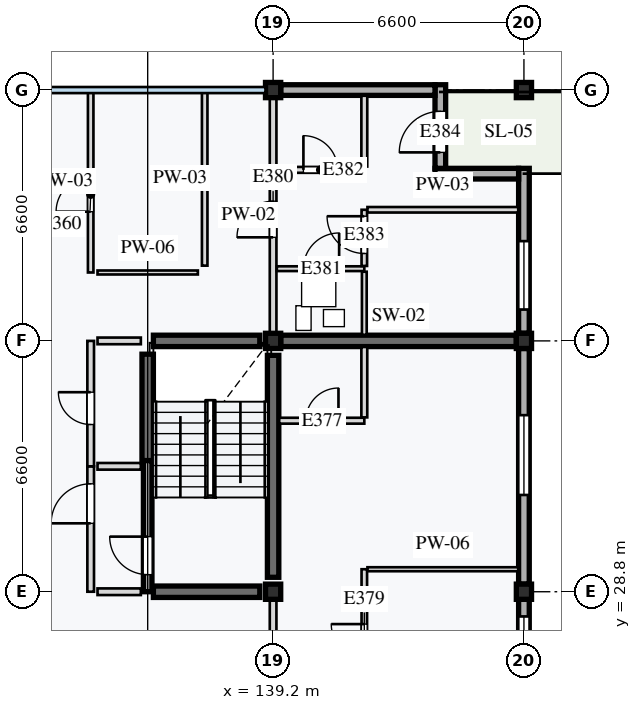
"""IFC4 building model, lengths in metres.
Left out: names, types, materials, properties, quantities, classifications, styles, units other than length and angle.
Written with IfcOpenShell. Run it as: python <this file> out.ifc"""

import sys

from ifc_helpers import new_model, si_unit, direction, frame, frame_2d, origin, origin_2d, place, context, subcontext, project, spatial, rectangle, extrude, element, fill, save


model = new_model("IFC4")
c1 = context("Model", 3, precision=1e-05, world=origin(), true_north=direction((0.0, 1.0)))
c2 = subcontext(c1, "Body", "Model", "MODEL_VIEW")
j1 = project(units=[si_unit("LENGTHUNIT", "METRE"), si_unit("PLANEANGLEUNIT", "RADIAN")], contexts=[c1])
p1 = place(None, origin())
s1 = spatial("IfcSite", under=j1, at=p1, CompositionType="ELEMENT")
p2 = place(p1, origin())
s2 = spatial("IfcBuilding", under=s1, at=p2, CompositionType="ELEMENT")
p3 = place(p2, frame((0.0, 0.0, 30.8)))
s3 = spatial("IfcBuildingStorey", under=s2, at=p3, CompositionType="ELEMENT", Elevation=30.8)
for number, where, z_axis, x_axis in (
    (1, (139.2, 28.8, 0.0), (0.0, 0.0, 1.0), (1.0, 0.0, 0.0)),
    (2, (145.8, 28.8, 0.0), (0.0, 0.0, 1.0), (1.0, 0.0, 0.0)),
    (3, (139.2, 35.4, 0.0), (0.0, 0.0, 1.0), (1.0, 0.0, 0.0)),
    (4, (145.8, 35.4, 0.0), (0.0, 0.0, 1.0), (1.0, 0.0, 0.0)),
    (5, (139.2, 42.0, 0.0), (0.0, 0.0, 1.0), (1.0, 0.0, 0.0)),
    (6, (145.8, 42.0, 0.0), (0.0, 0.0, 1.0), (1.0, 0.0, 0.0)),
):
    element("IfcColumn", number, at=place(p3, frame(where, z_axis=z_axis, x_axis=x_axis)), inside=s3, PredefinedType="COLUMN", context=c2, shape_type="SweptSolid", body=[
        extrude(rectangle(XDim=0.4, YDim=0.4, at=origin_2d()), origin(), (0.0, 0.0, 1.0), 3.2),
    ])
p4 = place(p3, frame((139.2, 29.18, 0.0), z_axis=(0.0, 0.0, 1.0), x_axis=(0.0, 1.0, 0.0)))
e7 = element("IfcWall", 7, at=p4, inside=s3, PredefinedType="SHEAR", context=c2, shape_type="SweptSolid", body=[
    extrude(rectangle(XDim=5.84, YDim=0.3, at=frame_2d((2.92, 0.0))), origin(), (0.0, 0.0, 1.0), 2.97),
])
for number, where, z_axis, x_axis in (
    (8, (135.9, 32.25, 0.0), (0.0, 0.0, 1.0), (0.0, 1.0, 0.0)),
    (9, (136.05, 28.8, 0.0), (0.0, 0.0, 1.0), (1.0, 0.0, 0.0)),
    (10, (136.05, 35.4, 0.0), (0.0, 0.0, 1.0), (1.0, 0.0, 0.0)),
):
    element("IfcWall", number, at=place(p3, frame(where, z_axis=z_axis, x_axis=x_axis)), inside=s3, PredefinedType="SHEAR", context=c2, shape_type="SweptSolid", body=[
        extrude(rectangle(XDim=2.8, YDim=0.3, at=frame_2d((1.4, 0.0))), origin(), (0.0, 0.0, 1.0), 2.97),
    ])
p5 = place(p3, frame((139.4, 35.4, 0.0), z_axis=(0.0, 0.0, 1.0), x_axis=(1.0, 0.0, 0.0)))
e11 = element("IfcWall", 11, at=p5, inside=s3, PredefinedType="SHEAR", context=c2, shape_type="SweptSolid", body=[
    extrude(rectangle(XDim=6.2, YDim=0.3, at=frame_2d((3.1, 0.0))), origin(), (0.0, 0.0, 1.0), 2.97),
])
p6 = place(p3, frame((145.8, 22.4, 0.0), z_axis=(0.0, 0.0, 1.0), x_axis=(0.0, 1.0, 0.0)))
e12 = element("IfcWall", 12, at=p6, inside=s3, PredefinedType="STANDARD", context=c2, shape_type="SweptSolid", body=[
    extrude(rectangle(XDim=6.2, YDim=0.28, at=frame_2d((3.1, 0.0))), origin(), (0.0, 0.0, 1.0), 2.6),
])
p7 = place(p6, frame((0.525, 0.0, 0.85)))
e13 = element("IfcOpeningElement", 13, at=p7, cuts=e12, PredefinedType="OPENING", context=c2, shape_type="SweptSolid", body=[
    extrude(rectangle(XDim=1.8, YDim=1.35, at=frame_2d((0.9, 0.675))), frame((0.0, 0.15, 0.0), z_axis=(0.0, -1.0, 0.0), x_axis=(1.0, 0.0, 0.0)), (0.0, 0.0, 1.0), 0.3),
])
p8 = place(p6, frame((3.95, 0.0, 0.85)))
e14 = element("IfcOpeningElement", 14, at=p8, cuts=e12, PredefinedType="OPENING", context=c2, shape_type="SweptSolid", body=[
    extrude(rectangle(XDim=1.8, YDim=1.35, at=frame_2d((0.9, 0.675))), frame((0.0, 0.15, 0.0), z_axis=(0.0, -1.0, 0.0), x_axis=(1.0, 0.0, 0.0)), (0.0, 0.0, 1.0), 0.3),
])
p9 = place(p3, frame((145.8, 29.0, 0.0), z_axis=(0.0, 0.0, 1.0), x_axis=(0.0, 1.0, 0.0)))
e15 = element("IfcWall", 15, at=p9, inside=s3, PredefinedType="STANDARD", context=c2, shape_type="SweptSolid", body=[
    extrude(rectangle(XDim=6.2, YDim=0.28, at=frame_2d((3.1, 0.0))), origin(), (0.0, 0.0, 1.0), 2.6),
])
p10 = place(p9, frame((2.346, 0.0, 0.85)))
e16 = element("IfcOpeningElement", 16, at=p10, cuts=e15, PredefinedType="OPENING", context=c2, shape_type="SweptSolid", body=[
    extrude(rectangle(XDim=2.1, YDim=1.55, at=frame_2d((1.05, 0.775))), frame((0.0, 0.15, 0.0), z_axis=(0.0, -1.0, 0.0), x_axis=(1.0, 0.0, 0.0)), (0.0, 0.0, 1.0), 0.3),
])
p11 = place(p3, frame((145.8, 35.6, 0.0), z_axis=(0.0, 0.0, 1.0), x_axis=(0.0, 1.0, 0.0)))
e17 = element("IfcWall", 17, at=p11, inside=s3, PredefinedType="STANDARD", context=c2, shape_type="SweptSolid", body=[
    extrude(rectangle(XDim=4.34, YDim=0.28, at=frame_2d((2.17, 0.0))), origin(), (0.0, 0.0, 1.0), 2.6),
])
p12 = place(p11, frame((0.625, 0.0, 0.85)))
e18 = element("IfcOpeningElement", 18, at=p12, cuts=e17, PredefinedType="OPENING", context=c2, shape_type="SweptSolid", body=[
    extrude(rectangle(XDim=1.8, YDim=1.35, at=frame_2d((0.9, 0.675))), frame((0.0, 0.15, 0.0), z_axis=(0.0, -1.0, 0.0), x_axis=(1.0, 0.0, 0.0)), (0.0, 0.0, 1.0), 0.3),
])
p13 = place(p3, frame((145.66, 39.8, 0.0), z_axis=(0.0, 0.0, 1.0), x_axis=(-1.0, 0.0, 0.0)))
e19 = element("IfcWall", 19, at=p13, inside=s3, PredefinedType="STANDARD", context=c2, shape_type="SweptSolid", body=[
    extrude(rectangle(XDim=2.2, YDim=0.28, at=frame_2d((1.1, 0.0))), origin(), (0.0, 0.0, 1.0), 2.97),
])
p14 = place(p3, frame((143.6, 39.94, 0.0), z_axis=(0.0, 0.0, 1.0), x_axis=(0.0, 1.0, 0.0)))
e20 = element("IfcWall", 20, at=p14, inside=s3, PredefinedType="STANDARD", context=c2, shape_type="SweptSolid", body=[
    extrude(rectangle(XDim=2.2, YDim=0.28, at=frame_2d((1.1, 0.0))), origin(), (0.0, 0.0, 1.0), 2.97),
])
p15 = place(p14, frame((0.42, 0.0, 0.0)))
e21 = element("IfcOpeningElement", 21, at=p15, cuts=e20, PredefinedType="OPENING", context=c2, shape_type="SweptSolid", body=[
    extrude(rectangle(XDim=1.08, YDim=2.22, at=frame_2d((0.54, 1.11))), frame((0.0, 0.15, 0.0), z_axis=(0.0, -1.0, 0.0), x_axis=(1.0, 0.0, 0.0)), (0.0, 0.0, 1.0), 0.3),
])
p16 = place(p3, frame((139.4, 42.0, 0.0), z_axis=(0.0, 0.0, 1.0), x_axis=(1.0, 0.0, 0.0)))
e22 = element("IfcWall", 22, at=p16, inside=s3, PredefinedType="STANDARD", context=c2, shape_type="SweptSolid", body=[
    extrude(rectangle(XDim=4.06, YDim=0.28, at=frame_2d((2.03, 0.0))), origin(), (0.0, 0.0, 1.0), 2.65),
])
p17 = place(p3, frame((135.9, 28.8, 0.0), z_axis=(0.0, 0.0, 1.0), x_axis=(0.0, 1.0, 0.0)))
e23 = element("IfcWall", 23, at=p17, inside=s3, PredefinedType="STANDARD", context=c2, shape_type="SweptSolid", body=[
    extrude(rectangle(XDim=3.45, YDim=0.225, at=frame_2d((1.725, 0.0))), origin(), (0.0, 0.0, 1.0), 2.97),
])
p18 = place(p17, frame((0.45, 0.0, 0.0)))
e24 = element("IfcOpeningElement", 24, at=p18, cuts=e23, PredefinedType="OPENING", context=c2, shape_type="SweptSolid", body=[
    extrude(rectangle(XDim=1.0, YDim=2.16, at=frame_2d((0.5, 1.08))), frame((0.0, 0.123, 0.0), z_axis=(0.0, -1.0, 0.0), x_axis=(1.0, 0.0, 0.0)), (0.0, 0.0, 1.0), 0.245),
])
p19 = place(p3, frame((134.4, 28.8, 0.0), z_axis=(0.0, 0.0, 1.0), x_axis=(0.0, 1.0, 0.0)))
e25 = element("IfcWall", 25, at=p19, inside=s3, PredefinedType="PARTITIONING", context=c2, shape_type="SweptSolid", body=[
    extrude(rectangle(XDim=3.3, YDim=0.175, at=frame_2d((1.65, 0.0))), origin(), (0.0, 0.0, 1.0), 2.97),
])
p20 = place(p19, frame((1.8, 0.0, 0.0)))
e26 = element("IfcOpeningElement", 26, at=p20, cuts=e25, PredefinedType="OPENING", context=c2, shape_type="SweptSolid", body=[
    extrude(rectangle(XDim=1.04, YDim=2.12, at=frame_2d((0.52, 1.06))), frame((0.0, 0.097, 0.0), z_axis=(0.0, -1.0, 0.0), x_axis=(1.0, 0.0, 0.0)), (0.0, 0.0, 1.0), 0.195),
])
p21 = place(p3, frame((134.4, 32.1, 0.0), z_axis=(0.0, 0.0, 1.0), x_axis=(0.0, 1.0, 0.0)))
e27 = element("IfcWall", 27, at=p21, inside=s3, PredefinedType="PARTITIONING", context=c2, shape_type="SweptSolid", body=[
    extrude(rectangle(XDim=3.3, YDim=0.175, at=frame_2d((1.65, 0.0))), origin(), (0.0, 0.0, 1.0), 2.97),
])
p22 = place(p21, frame((1.1, 0.0, 0.0)))
e28 = element("IfcOpeningElement", 28, at=p22, cuts=e27, PredefinedType="OPENING", context=c2, shape_type="SweptSolid", body=[
    extrude(rectangle(XDim=0.85, YDim=2.0, at=frame_2d((0.425, 1.0))), frame((0.0, 0.097, 0.0), z_axis=(0.0, -1.0, 0.0), x_axis=(1.0, 0.0, 0.0)), (0.0, 0.0, 1.0), 0.195),
])
for number, where, z_axis, x_axis in (
    (29, (134.58, 28.8, 0.0), (0.0, 0.0, 1.0), (1.0, 0.0, 0.0)),
    (30, (134.58, 32.1, 0.0), (0.0, 0.0, 1.0), (1.0, 0.0, 0.0)),
    (31, (134.58, 35.4, 0.0), (0.0, 0.0, 1.0), (1.0, 0.0, 0.0)),
):
    element("IfcWall", number, at=place(p3, frame(where, z_axis=z_axis, x_axis=x_axis)), inside=s3, PredefinedType="PARTITIONING", context=c2, shape_type="SweptSolid", body=[
        extrude(rectangle(XDim=1.14, YDim=0.175, at=frame_2d((0.57, 0.0))), origin(), (0.0, 0.0, 1.0), 2.97),
    ])
p23 = place(p3, frame((134.4, 37.2, 0.0), z_axis=(0.0, 0.0, 1.0), x_axis=(0.0, 1.0, 0.0)))
e32 = element("IfcWall", 32, at=p23, inside=s3, PredefinedType="PARTITIONING", context=c2, shape_type="SweptSolid", body=[
    extrude(rectangle(XDim=4.8, YDim=0.145, at=frame_2d((2.4, 0.0))), origin(), (0.0, 0.0, 1.0), 2.97),
])
p24 = place(p23, frame((1.6, 0.0, 0.0)))
e33 = element("IfcOpeningElement", 33, at=p24, cuts=e32, PredefinedType="OPENING", context=c2, shape_type="SweptSolid", body=[
    extrude(rectangle(XDim=0.91, YDim=2.14, at=frame_2d((0.455, 1.07))), frame((0.0, 0.083, 0.0), z_axis=(0.0, -1.0, 0.0), x_axis=(1.0, 0.0, 0.0)), (0.0, 0.0, 1.0), 0.165),
])
p25 = place(p3, frame((137.4, 37.38, 0.0), z_axis=(0.0, 0.0, 1.0), x_axis=(0.0, 1.0, 0.0)))
e34 = element("IfcWall", 34, at=p25, inside=s3, PredefinedType="PARTITIONING", context=c2, shape_type="SweptSolid", body=[
    extrude(rectangle(XDim=4.6, YDim=0.145, at=frame_2d((2.3, 0.0))), origin(), (0.0, 0.0, 1.0), 2.97),
])
p26 = place(p3, frame((134.58, 37.2, 0.0), z_axis=(0.0, 0.0, 1.0), x_axis=(1.0, 0.0, 0.0)))
e35 = element("IfcWall", 35, at=p26, inside=s3, PredefinedType="PARTITIONING", context=c2, shape_type="SweptSolid", body=[
    extrude(rectangle(XDim=2.64, YDim=0.105, at=frame_2d((1.32, 0.0))), origin(), (0.0, 0.0, 1.0), 2.97),
])
p27 = place(p3, frame((139.2, 22.2, 0.0), z_axis=(0.0, 0.0, 1.0), x_axis=(0.0, 1.0, 0.0)))
e36 = element("IfcWall", 36, at=p27, inside=s3, PredefinedType="PARTITIONING", context=c2, shape_type="SweptSolid", body=[
    extrude(rectangle(XDim=6.6, YDim=0.175, at=frame_2d((3.3, 0.0))), origin(), (0.0, 0.0, 1.0), 2.55),
])
p28 = place(p27, frame((3.85, 0.0, 0.0)))
e37 = element("IfcOpeningElement", 37, at=p28, cuts=e36, PredefinedType="OPENING", context=c2, shape_type="SweptSolid", body=[
    extrude(rectangle(XDim=0.96, YDim=2.18, at=frame_2d((0.48, 1.09))), frame((0.0, 0.097, 0.0), z_axis=(0.0, -1.0, 0.0), x_axis=(1.0, 0.0, 0.0)), (0.0, 0.0, 1.0), 0.195),
])
p29 = place(p3, frame((139.36, 33.3, 0.0), z_axis=(0.0, 0.0, 1.0), x_axis=(1.0, 0.0, 0.0)))
e38 = element("IfcWall", 38, at=p29, inside=s3, PredefinedType="PARTITIONING", context=c2, shape_type="SweptSolid", body=[
    extrude(rectangle(XDim=2.24, YDim=0.155, at=frame_2d((1.12, 0.0))), origin(), (0.0, 0.0, 1.0), 2.97),
])
p30 = place(p29, frame((0.7, 0.0, 0.0)))
e39 = element("IfcOpeningElement", 39, at=p30, cuts=e38, PredefinedType="OPENING", context=c2, shape_type="SweptSolid", body=[
    extrude(rectangle(XDim=0.86, YDim=2.12, at=frame_2d((0.43, 1.06))), frame((0.0, 0.087, 0.0), z_axis=(0.0, -1.0, 0.0), x_axis=(1.0, 0.0, 0.0)), (0.0, 0.0, 1.0), 0.175),
])
p31 = place(p3, frame((141.6, 33.387, 0.0), z_axis=(0.0, 0.0, 1.0), x_axis=(0.0, 1.0, 0.0)))
e40 = element("IfcWall", 40, at=p31, inside=s3, PredefinedType="PARTITIONING", context=c2, shape_type="SweptSolid", body=[
    extrude(rectangle(XDim=1.853, YDim=0.155, at=frame_2d((0.926, 0.0))), origin(), (0.0, 0.0, 1.0), 2.97),
])
p32 = place(p3, frame((141.6, 25.532, 0.0), z_axis=(0.0, 0.0, 1.0), x_axis=(0.0, 1.0, 0.0)))
e41 = element("IfcWall", 41, at=p32, inside=s3, PredefinedType="PARTITIONING", context=c2, shape_type="SweptSolid", body=[
    extrude(rectangle(XDim=3.86, YDim=0.145, at=frame_2d((1.93, 0.0))), origin(), (0.0, 0.0, 1.0), 2.97),
])
p33 = place(p32, frame((1.546, 0.0, 0.0)))
e42 = element("IfcOpeningElement", 42, at=p33, cuts=e41, PredefinedType="OPENING", context=c2, shape_type="SweptSolid", body=[
    extrude(rectangle(XDim=0.87, YDim=2.08, at=frame_2d((0.435, 1.04))), frame((0.0, 0.083, 0.0), z_axis=(0.0, -1.0, 0.0), x_axis=(1.0, 0.0, 0.0)), (0.0, 0.0, 1.0), 0.165),
])
p34 = place(p3, frame((141.683, 29.392, 0.0), z_axis=(0.0, 0.0, 1.0), x_axis=(1.0, 0.0, 0.0)))
e43 = element("IfcWall", 43, at=p34, inside=s3, PredefinedType="PARTITIONING", context=c2, shape_type="SweptSolid", body=[
    extrude(rectangle(XDim=3.967, YDim=0.105, at=frame_2d((1.984, 0.0))), origin(), (0.0, 0.0, 1.0), 2.97),
])
p35 = place(p3, frame((139.2, 35.4, 0.0), z_axis=(0.0, 0.0, 1.0), x_axis=(0.0, 1.0, 0.0)))
e44 = element("IfcWall", 44, at=p35, inside=s3, PredefinedType="PARTITIONING", context=c2, shape_type="SweptSolid", body=[
    extrude(rectangle(XDim=6.6, YDim=0.175, at=frame_2d((3.3, 0.0))), origin(), (0.0, 0.0, 1.0), 2.55),
])
p36 = place(p35, frame((2.725, 0.0, 0.0)))
e45 = element("IfcOpeningElement", 45, at=p36, cuts=e44, PredefinedType="OPENING", context=c2, shape_type="SweptSolid", body=[
    extrude(rectangle(XDim=0.95, YDim=2.1, at=frame_2d((0.475, 1.05))), frame((0.0, 0.097, 0.0), z_axis=(0.0, -1.0, 0.0), x_axis=(1.0, 0.0, 0.0)), (0.0, 0.0, 1.0), 0.195),
])
p37 = place(p3, frame((139.298, 37.3, 0.0), z_axis=(0.0, 0.0, 1.0), x_axis=(1.0, 0.0, 0.0)))
e46 = element("IfcWall", 46, at=p37, inside=s3, PredefinedType="PARTITIONING", context=c2, shape_type="SweptSolid", body=[
    extrude(rectangle(XDim=2.302, YDim=0.125, at=frame_2d((1.151, 0.0))), origin(), (0.0, 0.0, 1.0), 2.97),
])
p38 = place(p37, frame((0.7, 0.0, 0.0)))
e47 = element("IfcOpeningElement", 47, at=p38, cuts=e46, PredefinedType="OPENING", context=c2, shape_type="SweptSolid", body=[
    extrude(rectangle(XDim=0.94, YDim=2.08, at=frame_2d((0.47, 1.04))), frame((0.0, 0.073, 0.0), z_axis=(0.0, -1.0, 0.0), x_axis=(1.0, 0.0, 0.0)), (0.0, 0.0, 1.0), 0.145),
])
p39 = place(p3, frame((141.6, 35.56, 0.0), z_axis=(0.0, 0.0, 1.0), x_axis=(0.0, 1.0, 0.0)))
e48 = element("IfcWall", 48, at=p39, inside=s3, PredefinedType="PARTITIONING", context=c2, shape_type="SweptSolid", body=[
    extrude(rectangle(XDim=1.66, YDim=0.125, at=frame_2d((0.83, 0.0))), origin(), (0.0, 0.0, 1.0), 2.97),
])
p40 = place(p3, frame((139.298, 39.9, 0.0), z_axis=(0.0, 0.0, 1.0), x_axis=(1.0, 0.0, 0.0)))
e49 = element("IfcWall", 49, at=p40, inside=s3, PredefinedType="PARTITIONING", context=c2, shape_type="SweptSolid", body=[
    extrude(rectangle(XDim=2.302, YDim=0.155, at=frame_2d((1.151, 0.0))), origin(), (0.0, 0.0, 1.0), 2.97),
])
p41 = place(p40, frame((0.7, 0.0, 0.0)))
e50 = element("IfcOpeningElement", 50, at=p41, cuts=e49, PredefinedType="OPENING", context=c2, shape_type="SweptSolid", body=[
    extrude(rectangle(XDim=0.9, YDim=2.16, at=frame_2d((0.45, 1.08))), frame((0.0, 0.087, 0.0), z_axis=(0.0, -1.0, 0.0), x_axis=(1.0, 0.0, 0.0)), (0.0, 0.0, 1.0), 0.175),
])
p42 = place(p3, frame((141.6, 39.988, 0.0), z_axis=(0.0, 0.0, 1.0), x_axis=(0.0, 1.0, 0.0)))
e51 = element("IfcWall", 51, at=p42, inside=s3, PredefinedType="PARTITIONING", context=c2, shape_type="SweptSolid", body=[
    extrude(rectangle(XDim=1.863, YDim=0.155, at=frame_2d((0.931, 0.0))), origin(), (0.0, 0.0, 1.0), 2.97),
])
p43 = place(p3, frame((141.6, 37.373, 0.0), z_axis=(0.0, 0.0, 1.0), x_axis=(0.0, 1.0, 0.0)))
e52 = element("IfcWall", 52, at=p43, inside=s3, PredefinedType="PARTITIONING", context=c2, shape_type="SweptSolid", body=[
    extrude(rectangle(XDim=1.478, YDim=0.145, at=frame_2d((0.739, 0.0))), origin(), (0.0, 0.0, 1.0), 2.97),
])
p44 = place(p43, frame((0.327, 0.0, 0.0)))
e53 = element("IfcOpeningElement", 53, at=p44, cuts=e52, PredefinedType="OPENING", context=c2, shape_type="SweptSolid", body=[
    extrude(rectangle(XDim=0.98, YDim=2.12, at=frame_2d((0.49, 1.06))), frame((0.0, 0.083, 0.0), z_axis=(0.0, -1.0, 0.0), x_axis=(1.0, 0.0, 0.0)), (0.0, 0.0, 1.0), 0.165),
])
p45 = place(p3, frame((141.683, 38.85, 0.0), z_axis=(0.0, 0.0, 1.0), x_axis=(1.0, 0.0, 0.0)))
e54 = element("IfcWall", 54, at=p45, inside=s3, PredefinedType="PARTITIONING", context=c2, shape_type="SweptSolid", body=[
    extrude(rectangle(XDim=3.967, YDim=0.145, at=frame_2d((1.984, 0.0))), origin(), (0.0, 0.0, 1.0), 2.97),
])
p46 = place(p8, origin())
e55 = element("IfcWindow", 55, at=p46, inside=s3, PartitioningType="SINGLE_PANEL", PredefinedType="WINDOW", context=c2, shape_type="SweptSolid", body=[
    extrude(rectangle(XDim=1.8, YDim=1.35, at=frame_2d((0.9, 0.675))), frame((0.0, 0.03, 0.0), z_axis=(0.0, -1.0, 0.0), x_axis=(1.0, 0.0, 0.0)), (0.0, 0.0, 1.0), 0.06),
])
fill(e14, e55)
p47 = place(p10, origin())
e56 = element("IfcWindow", 56, at=p47, inside=s3, PartitioningType="SINGLE_PANEL", PredefinedType="WINDOW", context=c2, shape_type="SweptSolid", body=[
    extrude(rectangle(XDim=2.1, YDim=1.55, at=frame_2d((1.05, 0.775))), frame((0.0, 0.03, 0.0), z_axis=(0.0, -1.0, 0.0), x_axis=(1.0, 0.0, 0.0)), (0.0, 0.0, 1.0), 0.06),
])
fill(e16, e56)
p48 = place(p12, origin())
e57 = element("IfcWindow", 57, at=p48, inside=s3, PartitioningType="SINGLE_PANEL", PredefinedType="WINDOW", context=c2, shape_type="SweptSolid", body=[
    extrude(rectangle(XDim=1.8, YDim=1.35, at=frame_2d((0.9, 0.675))), frame((0.0, 0.03, 0.0), z_axis=(0.0, -1.0, 0.0), x_axis=(1.0, 0.0, 0.0)), (0.0, 0.0, 1.0), 0.06),
])
fill(e18, e57)
p49 = place(p15, origin())
e58 = element("IfcDoor", 58, at=p49, inside=s3, OperationType="SINGLE_SWING_LEFT", PredefinedType="DOOR", context=c2, shape_type="SweptSolid", body=[
    extrude(rectangle(XDim=1.08, YDim=2.22, at=frame_2d((0.54, 1.11))), frame((0.0, 0.025, 0.0), z_axis=(0.0, -1.0, 0.0), x_axis=(1.0, 0.0, 0.0)), (0.0, 0.0, 1.0), 0.05),
])
fill(e21, e58)
p50 = place(p18, origin())
e59 = element("IfcDoor", 59, at=p50, inside=s3, OperationType="SINGLE_SWING_RIGHT", PredefinedType="DOOR", context=c2, shape_type="SweptSolid", body=[
    extrude(rectangle(XDim=1.0, YDim=2.16, at=frame_2d((0.5, 1.08))), frame((0.0, 0.025, 0.0), z_axis=(0.0, -1.0, 0.0), x_axis=(1.0, 0.0, 0.0)), (0.0, 0.0, 1.0), 0.05),
])
fill(e24, e59)
p51 = place(p20, origin())
e60 = element("IfcDoor", 60, at=p51, inside=s3, OperationType="SINGLE_SWING_LEFT", PredefinedType="DOOR", context=c2, shape_type="SweptSolid", body=[
    extrude(rectangle(XDim=1.04, YDim=2.12, at=frame_2d((0.52, 1.06))), frame((0.0, 0.025, 0.0), z_axis=(0.0, -1.0, 0.0), x_axis=(1.0, 0.0, 0.0)), (0.0, 0.0, 1.0), 0.05),
])
fill(e26, e60)
p52 = place(p22, origin())
e61 = element("IfcDoor", 61, at=p52, inside=s3, OperationType="SINGLE_SWING_RIGHT", PredefinedType="DOOR", context=c2, shape_type="SweptSolid", body=[
    extrude(rectangle(XDim=0.85, YDim=2.0, at=frame_2d((0.425, 1.0))), frame((0.0, 0.025, 0.0), z_axis=(0.0, -1.0, 0.0), x_axis=(1.0, 0.0, 0.0)), (0.0, 0.0, 1.0), 0.05),
])
fill(e28, e61)
p53 = place(p24, origin())
e62 = element("IfcDoor", 62, at=p53, inside=s3, OperationType="SINGLE_SWING_LEFT", PredefinedType="DOOR", context=c2, shape_type="SweptSolid", body=[
    extrude(rectangle(XDim=0.91, YDim=2.14, at=frame_2d((0.455, 1.07))), frame((0.0, 0.025, 0.0), z_axis=(0.0, -1.0, 0.0), x_axis=(1.0, 0.0, 0.0)), (0.0, 0.0, 1.0), 0.05),
])
fill(e33, e62)
p54 = place(p30, origin())
e63 = element("IfcDoor", 63, at=p54, inside=s3, OperationType="SINGLE_SWING_RIGHT", PredefinedType="DOOR", context=c2, shape_type="SweptSolid", body=[
    extrude(rectangle(XDim=0.86, YDim=2.12, at=frame_2d((0.43, 1.06))), frame((0.0, 0.025, 0.0), z_axis=(0.0, -1.0, 0.0), x_axis=(1.0, 0.0, 0.0)), (0.0, 0.0, 1.0), 0.05),
])
fill(e39, e63)
p55 = place(p33, origin())
e64 = element("IfcDoor", 64, at=p55, inside=s3, OperationType="SINGLE_SWING_RIGHT", PredefinedType="DOOR", context=c2, shape_type="SweptSolid", body=[
    extrude(rectangle(XDim=0.87, YDim=2.08, at=frame_2d((0.435, 1.04))), frame((0.0, 0.025, 0.0), z_axis=(0.0, -1.0, 0.0), x_axis=(1.0, 0.0, 0.0)), (0.0, 0.0, 1.0), 0.05),
])
fill(e42, e64)
p56 = place(p36, origin())
e65 = element("IfcDoor", 65, at=p56, inside=s3, OperationType="SINGLE_SWING_LEFT", PredefinedType="DOOR", context=c2, shape_type="SweptSolid", body=[
    extrude(rectangle(XDim=0.95, YDim=2.1, at=frame_2d((0.475, 1.05))), frame((0.0, 0.025, 0.0), z_axis=(0.0, -1.0, 0.0), x_axis=(1.0, 0.0, 0.0)), (0.0, 0.0, 1.0), 0.05),
])
fill(e45, e65)
p57 = place(p38, origin())
e66 = element("IfcDoor", 66, at=p57, inside=s3, OperationType="SINGLE_SWING_RIGHT", PredefinedType="DOOR", context=c2, shape_type="SweptSolid", body=[
    extrude(rectangle(XDim=0.94, YDim=2.08, at=frame_2d((0.47, 1.04))), frame((0.0, 0.025, 0.0), z_axis=(0.0, -1.0, 0.0), x_axis=(1.0, 0.0, 0.0)), (0.0, 0.0, 1.0), 0.05),
])
fill(e47, e66)
p58 = place(p41, origin())
e67 = element("IfcDoor", 67, at=p58, inside=s3, OperationType="SINGLE_SWING_LEFT", PredefinedType="DOOR", context=c2, shape_type="SweptSolid", body=[
    extrude(rectangle(XDim=0.9, YDim=2.16, at=frame_2d((0.45, 1.08))), frame((0.0, 0.025, 0.0), z_axis=(0.0, -1.0, 0.0), x_axis=(1.0, 0.0, 0.0)), (0.0, 0.0, 1.0), 0.05),
])
fill(e50, e67)
p59 = place(p44, origin())
e68 = element("IfcDoor", 68, at=p59, inside=s3, OperationType="SINGLE_SWING_RIGHT", PredefinedType="DOOR", context=c2, shape_type="SweptSolid", body=[
    extrude(rectangle(XDim=0.98, YDim=2.12, at=frame_2d((0.49, 1.06))), frame((0.0, 0.025, 0.0), z_axis=(0.0, -1.0, 0.0), x_axis=(1.0, 0.0, 0.0)), (0.0, 0.0, 1.0), 0.05),
])
fill(e53, e68)
save(model, sys.argv[1])
